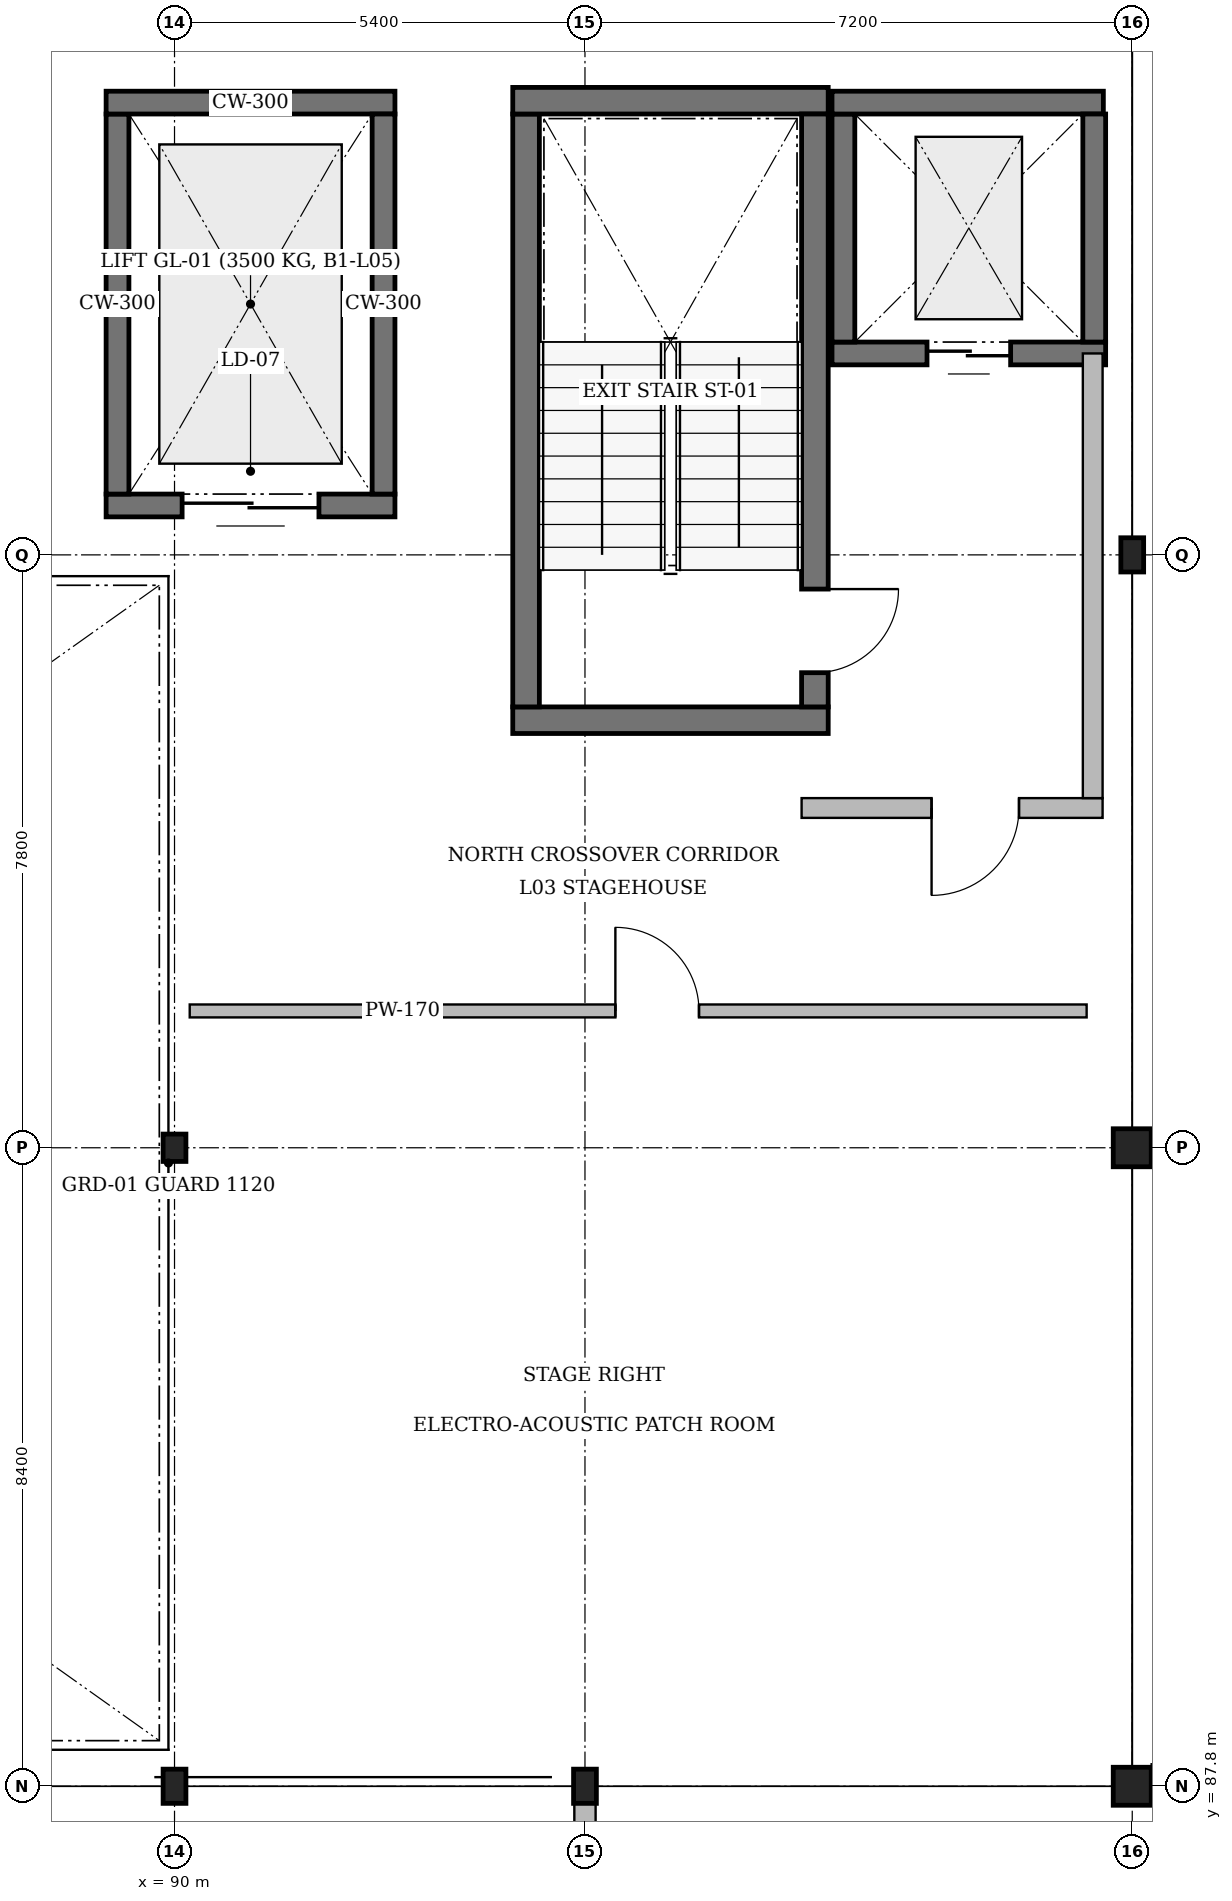
"""IFC4 building model, lengths in metres.
Left out: names, types, materials, properties, quantities, classifications, styles, units other than length and angle.
Written with IfcOpenShell. Run it as: python <this file> out.ifc"""

import sys

from ifc_helpers import new_model, si_unit, direction, frame, frame_2d, origin, origin_2d, place, context, subcontext, project, spatial, rectangle, i_section, extrude, element, fill, save


model = new_model("IFC4")
c1 = context("Model", 3, precision=1e-05, world=origin(), true_north=direction((0.0, 1.0)))
c2 = subcontext(c1, "Body", "Model", "MODEL_VIEW")
j1 = project(units=[si_unit("LENGTHUNIT", "METRE"), si_unit("PLANEANGLEUNIT", "RADIAN")], contexts=[c1])
p1 = place(None, origin())
s1 = spatial("IfcSite", under=j1, at=p1, CompositionType="ELEMENT")
p2 = place(p1, origin())
s2 = spatial("IfcBuilding", under=s1, at=p2, CompositionType="ELEMENT")
p3 = place(p2, frame((0.0, 0.0, 13.2)))
s3 = spatial("IfcBuildingStorey", under=s2, at=p3, CompositionType="ELEMENT", Elevation=13.2)
p4 = place(p3, frame((90.0, 87.8, 0.0), z_axis=(0.0, 0.0, 1.0), x_axis=(1.0, 0.0, 0.0)))
e1 = element("IfcColumn", 1, at=p4, inside=s3, PredefinedType="COLUMN", context=c2, shape_type="SweptSolid", body=[
    extrude(i_section(OverallWidth=0.3, OverallDepth=0.45, WebThickness=0.014, FlangeThickness=0.026, FilletRadius=0.027, at=origin_2d()), origin(), (0.0, 0.0, 1.0), 3.9),
])
p5 = place(p3, frame((90.0, 96.2, 0.0), z_axis=(0.0, 0.0, 1.0), x_axis=(1.0, 0.0, 0.0)))
e2 = element("IfcColumn", 2, at=p5, inside=s3, PredefinedType="COLUMN", context=c2, shape_type="SweptSolid", body=[
    extrude(i_section(OverallWidth=0.3, OverallDepth=0.36, WebThickness=0.012, FlangeThickness=0.022, FilletRadius=0.027, at=origin_2d()), origin(), (0.0, 0.0, 1.0), 3.9),
])
p6 = place(p3, frame((95.4, 87.8, 0.0), z_axis=(0.0, 0.0, 1.0), x_axis=(1.0, 0.0, 0.0)))
e3 = element("IfcColumn", 3, at=p6, inside=s3, PredefinedType="COLUMN", context=c2, shape_type="SweptSolid", body=[
    extrude(i_section(OverallWidth=0.3, OverallDepth=0.45, WebThickness=0.014, FlangeThickness=0.026, FilletRadius=0.027, at=origin_2d()), origin(), (0.0, 0.0, 1.0), 3.9),
])
for number, where, z_axis, x_axis in (
    (4, (102.6, 87.8, 0.0), (0.0, 0.0, 1.0), (1.0, 0.0, 0.0)),
    (5, (102.6, 96.2, 0.0), (0.0, 0.0, 1.0), (1.0, 0.0, 0.0)),
):
    element("IfcColumn", number, at=place(p3, frame(where, z_axis=z_axis, x_axis=x_axis)), inside=s3, PredefinedType="COLUMN", context=c2, shape_type="SweptSolid", body=[
        extrude(rectangle(XDim=0.5, YDim=0.5, at=origin_2d()), origin(), (0.0, 0.0, 1.0), 3.9),
    ])
p7 = place(p3, frame((102.6, 104.0, 0.0), z_axis=(0.0, 0.0, 1.0), x_axis=(1.0, 0.0, 0.0)))
e6 = element("IfcColumn", 6, at=p7, inside=s3, PredefinedType="COLUMN", context=c2, shape_type="SweptSolid", body=[
    extrude(i_section(OverallWidth=0.3, OverallDepth=0.45, WebThickness=0.014, FlangeThickness=0.026, FilletRadius=0.027, at=origin_2d()), origin(), (0.0, 0.0, 1.0), 3.9),
])
p8 = place(p3, frame((98.6, 101.825, 0.0), z_axis=(0.0, 0.0, 1.0), x_axis=(-1.0, 0.0, 0.0)))
e7 = element("IfcWall", 7, at=p8, inside=s3, PredefinedType="SOLIDWALL", context=c2, shape_type="SweptSolid", body=[
    extrude(rectangle(XDim=4.15, YDim=0.35, at=frame_2d((2.075, 0.0))), origin(), (0.0, 0.0, 1.0), 3.9),
])
p9 = place(p3, frame((94.625, 102.0, 0.0), z_axis=(0.0, 0.0, 1.0), x_axis=(0.0, 1.0, 0.0)))
e8 = element("IfcWall", 8, at=p9, inside=s3, PredefinedType="SOLIDWALL", context=c2, shape_type="SweptSolid", body=[
    extrude(rectangle(XDim=7.8, YDim=0.35, at=frame_2d((3.9, 0.0))), origin(), (0.0, 0.0, 1.0), 3.9),
])
p10 = place(p3, frame((94.45, 109.975, 0.0), z_axis=(0.0, 0.0, 1.0), x_axis=(1.0, 0.0, 0.0)))
e9 = element("IfcWall", 9, at=p10, inside=s3, PredefinedType="SOLIDWALL", context=c2, shape_type="SweptSolid", body=[
    extrude(rectangle(XDim=4.15, YDim=0.35, at=frame_2d((2.075, 0.0))), origin(), (0.0, 0.0, 1.0), 3.9),
])
p11 = place(p3, frame((98.425, 109.8, 0.0), z_axis=(0.0, 0.0, 1.0), x_axis=(0.0, -1.0, 0.0)))
e10 = element("IfcWall", 10, at=p11, inside=s3, PredefinedType="SOLIDWALL", context=c2, shape_type="SweptSolid", body=[
    extrude(rectangle(XDim=7.8, YDim=0.35, at=frame_2d((3.9, 0.0))), origin(), (0.0, 0.0, 1.0), 3.9),
])
p12 = place(p11, frame((6.25, 0.0, 0.0)))
e11 = element("IfcOpeningElement", 11, at=p12, cuts=e10, PredefinedType="OPENING", context=c2, shape_type="SweptSolid", body=[
    extrude(rectangle(XDim=1.1, YDim=2.15, at=frame_2d((0.55, 1.075))), frame((0.0, 0.195, 0.0), z_axis=(0.0, -1.0, 0.0), x_axis=(1.0, 0.0, 0.0)), (0.0, 0.0, 1.0), 0.39),
])
p13 = place(p3, frame((102.25, 106.65, 0.0), z_axis=(0.0, 0.0, 1.0), x_axis=(-1.0, 0.0, 0.0)))
e12 = element("IfcWall", 12, at=p13, inside=s3, PredefinedType="SOLIDWALL", context=c2, shape_type="SweptSolid", body=[
    extrude(rectangle(XDim=3.6, YDim=0.3, at=frame_2d((1.8, 0.0))), origin(), (0.0, 0.0, 1.0), 3.9),
])
p14 = place(p13, frame((1.25, 0.0, 0.0)))
e13 = element("IfcOpeningElement", 13, at=p14, cuts=e12, PredefinedType="OPENING", context=c2, shape_type="SweptSolid", body=[
    extrude(rectangle(XDim=1.1, YDim=2.1, at=frame_2d((0.55, 1.05))), frame((0.0, 0.17, 0.0), z_axis=(0.0, -1.0, 0.0), x_axis=(1.0, 0.0, 0.0)), (0.0, 0.0, 1.0), 0.34),
])
p15 = place(p3, frame((98.8, 106.8, 0.0), z_axis=(0.0, 0.0, 1.0), x_axis=(0.0, 1.0, 0.0)))
e14 = element("IfcWall", 14, at=p15, inside=s3, PredefinedType="SOLIDWALL", context=c2, shape_type="SweptSolid", body=[
    extrude(rectangle(XDim=3.0, YDim=0.3, at=frame_2d((1.5, 0.0))), origin(), (0.0, 0.0, 1.0), 3.9),
])
p16 = place(p3, frame((98.65, 109.95, 0.0), z_axis=(0.0, 0.0, 1.0), x_axis=(1.0, 0.0, 0.0)))
e15 = element("IfcWall", 15, at=p16, inside=s3, PredefinedType="SOLIDWALL", context=c2, shape_type="SweptSolid", body=[
    extrude(rectangle(XDim=3.57, YDim=0.3, at=frame_2d((1.785, 0.0))), origin(), (0.0, 0.0, 1.0), 3.9),
])
p17 = place(p3, frame((102.1, 109.8, 0.0), z_axis=(0.0, 0.0, 1.0), x_axis=(0.0, -1.0, 0.0)))
e16 = element("IfcWall", 16, at=p17, inside=s3, PredefinedType="SOLIDWALL", context=c2, shape_type="SweptSolid", body=[
    extrude(rectangle(XDim=3.0, YDim=0.3, at=frame_2d((1.5, 0.0))), origin(), (0.0, 0.0, 1.0), 3.9),
])
p18 = place(p3, frame((102.21, 100.67, 0.0), z_axis=(0.0, 0.0, 1.0), x_axis=(-1.0, 0.0, 0.0)))
e17 = element("IfcWall", 17, at=p18, inside=s3, PredefinedType="SOLIDWALL", context=c2, shape_type="SweptSolid", body=[
    extrude(rectangle(XDim=3.96, YDim=0.26, at=frame_2d((1.98, 0.0))), origin(), (0.0, 0.0, 1.0), 3.65),
])
p19 = place(p18, frame((1.1, 0.0, 0.0)))
e18 = element("IfcOpeningElement", 18, at=p19, cuts=e17, PredefinedType="OPENING", context=c2, shape_type="SweptSolid", body=[
    extrude(rectangle(XDim=1.15, YDim=2.2, at=frame_2d((0.575, 1.1))), frame((0.0, 0.15, 0.0), z_axis=(0.0, -1.0, 0.0), x_axis=(1.0, 0.0, 0.0)), (0.0, 0.0, 1.0), 0.3),
])
p20 = place(p3, frame((102.08, 106.65, 0.0), z_axis=(0.0, 0.0, 1.0), x_axis=(0.0, -1.0, 0.0)))
e19 = element("IfcWall", 19, at=p20, inside=s3, PredefinedType="SOLIDWALL", context=c2, shape_type="SweptSolid", body=[
    extrude(rectangle(XDim=5.85, YDim=0.26, at=frame_2d((2.925, 0.0))), origin(), (0.0, 0.0, 1.0), 3.65),
])
p21 = place(p3, frame((92.9, 104.65, 0.0), z_axis=(0.0, 0.0, 1.0), x_axis=(-1.0, 0.0, 0.0)))
e20 = element("IfcWall", 20, at=p21, inside=s3, PredefinedType="SOLIDWALL", context=c2, shape_type="SweptSolid", body=[
    extrude(rectangle(XDim=3.8, YDim=0.3, at=frame_2d((1.9, 0.0))), origin(), (0.0, 0.0, 1.0), 3.9),
])
p22 = place(p21, frame((1.0, 0.0, 0.0)))
e21 = element("IfcOpeningElement", 21, at=p22, cuts=e20, PredefinedType="OPENING", context=c2, shape_type="SweptSolid", body=[
    extrude(rectangle(XDim=1.8, YDim=2.4, at=frame_2d((0.9, 1.2))), frame((0.0, 0.17, 0.0), z_axis=(0.0, -1.0, 0.0), x_axis=(1.0, 0.0, 0.0)), (0.0, 0.0, 1.0), 0.34),
])
p23 = place(p3, frame((89.25, 104.8, 0.0), z_axis=(0.0, 0.0, 1.0), x_axis=(0.0, 1.0, 0.0)))
e22 = element("IfcWall", 22, at=p23, inside=s3, PredefinedType="SOLIDWALL", context=c2, shape_type="SweptSolid", body=[
    extrude(rectangle(XDim=5.0, YDim=0.3, at=frame_2d((2.5, 0.0))), origin(), (0.0, 0.0, 1.0), 3.9),
])
p24 = place(p3, frame((89.1, 109.95, 0.0), z_axis=(0.0, 0.0, 1.0), x_axis=(1.0, 0.0, 0.0)))
e23 = element("IfcWall", 23, at=p24, inside=s3, PredefinedType="SOLIDWALL", context=c2, shape_type="SweptSolid", body=[
    extrude(rectangle(XDim=3.8, YDim=0.3, at=frame_2d((1.9, 0.0))), origin(), (0.0, 0.0, 1.0), 3.9),
])
p25 = place(p3, frame((92.75, 109.8, 0.0), z_axis=(0.0, 0.0, 1.0), x_axis=(0.0, -1.0, 0.0)))
e24 = element("IfcWall", 24, at=p25, inside=s3, PredefinedType="SOLIDWALL", context=c2, shape_type="SweptSolid", body=[
    extrude(rectangle(XDim=5.0, YDim=0.3, at=frame_2d((2.5, 0.0))), origin(), (0.0, 0.0, 1.0), 3.9),
])
p26 = place(p3, frame((95.4, 85.387, -0.02), z_axis=(0.0, 0.0, 1.0), x_axis=(0.0, 1.0, 0.0)))
e25 = element("IfcWall", 25, at=p26, inside=s3, PredefinedType="SOLIDWALL", context=c2, shape_type="SweptSolid", body=[
    extrude(rectangle(XDim=2.183, YDim=0.28, at=frame_2d((1.092, 0.0))), origin(), (0.0, 0.0, 1.0), 2.505),
])
p27 = place(p26, frame((0.392, 0.0, 0.35)))
e26 = element("IfcOpeningElement", 26, at=p27, cuts=e25, PredefinedType="OPENING", context=c2, shape_type="SweptSolid", body=[
    extrude(rectangle(XDim=1.4, YDim=1.8, at=frame_2d((0.7, 0.9))), frame((0.0, 0.16, 0.0), z_axis=(0.0, -1.0, 0.0), x_axis=(1.0, 0.0, 0.0)), (0.0, 0.0, 1.0), 0.32),
])
p28 = place(p3, frame((102.855, 87.95, 0.0), z_axis=(0.0, 0.0, 1.0), x_axis=(1.0, 0.0, 0.0)))
e27 = element("IfcWall", 27, at=p28, inside=s3, PredefinedType="SOLIDWALL", context=c2, shape_type="SweptSolid", body=[
    extrude(rectangle(XDim=6.69, YDim=0.28, at=frame_2d((3.345, 0.0))), origin(), (0.0, 0.0, 1.0), 2.983),
])
p29 = place(p3, frame((90.2, 98.0, 0.0), z_axis=(0.0, 0.0, 1.0), x_axis=(1.0, 0.0, 0.0)))
e28 = element("IfcWall", 28, at=p29, inside=s3, PredefinedType="PARTITIONING", context=c2, shape_type="SweptSolid", body=[
    extrude(rectangle(XDim=11.8, YDim=0.17, at=frame_2d((5.9, 0.0))), origin(), (0.0, 0.0, 1.0), 3.65),
])
p30 = place(p29, frame((5.6, 0.0, 0.0)))
e29 = element("IfcOpeningElement", 29, at=p30, cuts=e28, PredefinedType="OPENING", context=c2, shape_type="SweptSolid", body=[
    extrude(rectangle(XDim=1.1, YDim=2.1, at=frame_2d((0.55, 1.05))), frame((0.0, 0.105, 0.0), z_axis=(0.0, -1.0, 0.0), x_axis=(1.0, 0.0, 0.0)), (0.0, 0.0, 1.0), 0.21),
])
p31 = place(p12, origin())
e30 = element("IfcDoor", 30, at=p31, inside=s3, OperationType="SINGLE_SWING_LEFT", PredefinedType="DOOR", context=c2, shape_type="SweptSolid", body=[
    extrude(rectangle(XDim=1.1, YDim=2.15, at=frame_2d((0.55, 1.075))), frame((0.0, 0.025, 0.0), z_axis=(0.0, -1.0, 0.0), x_axis=(1.0, 0.0, 0.0)), (0.0, 0.0, 1.0), 0.05),
])
fill(e11, e30)
p32 = place(p14, origin())
e31 = element("IfcDoor", 31, at=p32, inside=s3, OperationType="DOUBLE_DOOR_SLIDING", PredefinedType="DOOR", context=c2, shape_type="SweptSolid", body=[
    extrude(rectangle(XDim=1.1, YDim=2.1, at=frame_2d((0.55, 1.05))), frame((0.0, 0.025, 0.0), z_axis=(0.0, -1.0, 0.0), x_axis=(1.0, 0.0, 0.0)), (0.0, 0.0, 1.0), 0.05),
])
fill(e13, e31)
p33 = place(p19, origin())
e32 = element("IfcDoor", 32, at=p33, inside=s3, OperationType="SINGLE_SWING_RIGHT", PredefinedType="DOOR", context=c2, shape_type="SweptSolid", body=[
    extrude(rectangle(XDim=1.15, YDim=2.2, at=frame_2d((0.575, 1.1))), frame((0.0, 0.025, 0.0), z_axis=(0.0, -1.0, 0.0), x_axis=(1.0, 0.0, 0.0)), (0.0, 0.0, 1.0), 0.05),
])
fill(e18, e32)
p34 = place(p22, origin())
e33 = element("IfcDoor", 33, at=p34, inside=s3, OperationType="DOUBLE_DOOR_SLIDING", PredefinedType="DOOR", context=c2, shape_type="SweptSolid", body=[
    extrude(rectangle(XDim=1.8, YDim=2.4, at=frame_2d((0.9, 1.2))), frame((0.0, 0.025, 0.0), z_axis=(0.0, -1.0, 0.0), x_axis=(1.0, 0.0, 0.0)), (0.0, 0.0, 1.0), 0.05),
])
fill(e21, e33)
p35 = place(p30, origin())
e34 = element("IfcDoor", 34, at=p35, inside=s3, OperationType="SINGLE_SWING_LEFT", PredefinedType="DOOR", context=c2, shape_type="SweptSolid", body=[
    extrude(rectangle(XDim=1.1, YDim=2.1, at=frame_2d((0.55, 1.05))), frame((0.0, 0.025, 0.0), z_axis=(0.0, -1.0, 0.0), x_axis=(1.0, 0.0, 0.0)), (0.0, 0.0, 1.0), 0.05),
])
fill(e29, e34)
save(model, sys.argv[1])
